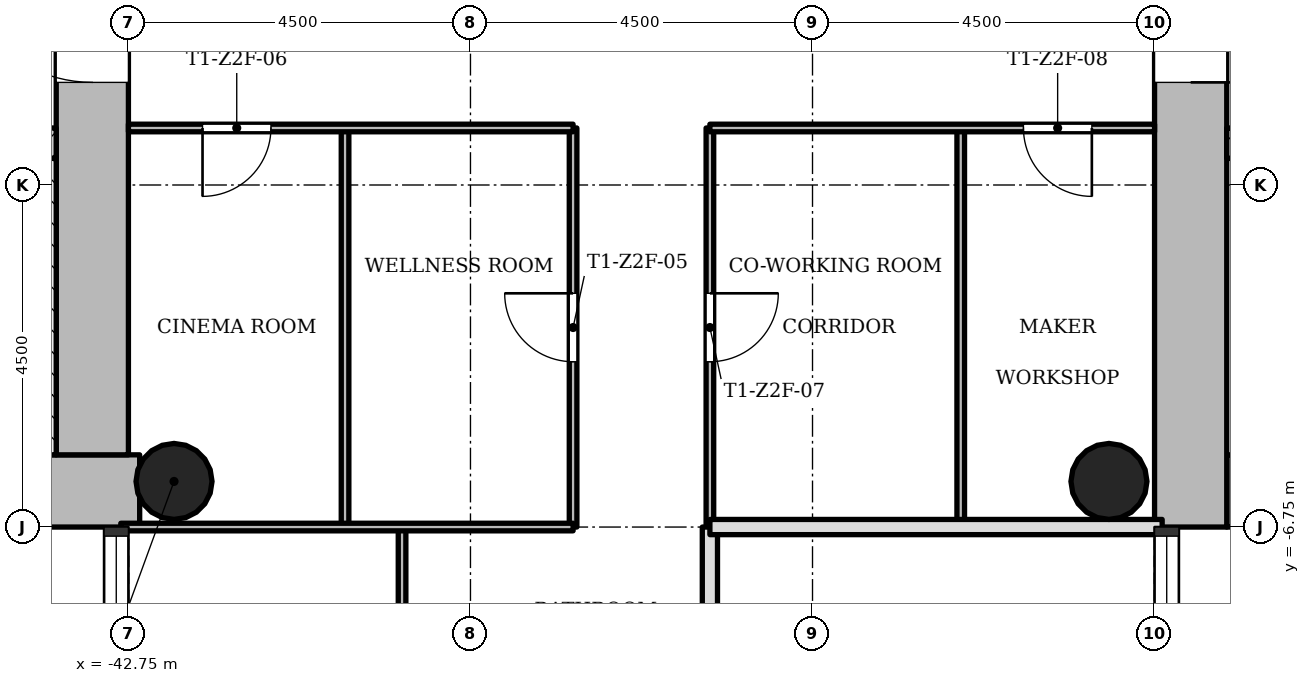
"""IFC4 building model, lengths in metres.
Left out: names, types, materials, properties, quantities, classifications, styles, units other than length and angle.
Written with IfcOpenShell. Run it as: python <this file> out.ifc"""

import sys

from ifc_helpers import new_model, si_unit, direction, frame, frame_2d, origin, origin_2d, place, context, subcontext, project, spatial, rectangle, hollow_circle, extrude, element, fill, save


model = new_model("IFC4")
c1 = context("Model", 3, precision=1e-05, world=origin(), true_north=direction((0.0, 1.0)))
c2 = subcontext(c1, "Body", "Model", "MODEL_VIEW")
j1 = project(units=[si_unit("LENGTHUNIT", "METRE"), si_unit("PLANEANGLEUNIT", "RADIAN")], contexts=[c1])
p1 = place(None, origin())
s1 = spatial("IfcSite", under=j1, at=p1, CompositionType="ELEMENT")
p2 = place(p1, origin())
s2 = spatial("IfcBuilding", under=s1, at=p2, CompositionType="ELEMENT")
p3 = place(p2, frame((0.0, 0.0, 107.2)))
s3 = spatial("IfcBuildingStorey", under=s2, at=p3, CompositionType="ELEMENT", Elevation=107.2)
p4 = place(p3, frame((-28.3, -6.275, 0.0), z_axis=(0.0, 0.0, 1.0), x_axis=(1.0, 0.0, 0.0)))
e1 = element("IfcWall", 1, at=p4, inside=s3, PredefinedType="SHEAR", context=c2, shape_type="SweptSolid", body=[
    extrude(rectangle(XDim=8.05, YDim=0.95, at=frame_2d((4.025, 0.0))), origin(), (0.0, 0.0, 1.0), 3.4),
])
p5 = place(p3, frame((-28.775, 5.8, 0.0), z_axis=(0.0, 0.0, 1.0), x_axis=(0.0, -1.0, 0.0)))
e2 = element("IfcWall", 2, at=p5, inside=s3, PredefinedType="SHEAR", context=c2, shape_type="SweptSolid", body=[
    extrude(rectangle(XDim=12.55, YDim=0.95, at=frame_2d((6.275, 0.0))), origin(), (0.0, 0.0, 1.0), 3.4),
])
p6 = place(p5, frame((4.9, 0.0, 0.0)))
e3 = element("IfcOpeningElement", 3, at=p6, cuts=e2, PredefinedType="OPENING", context=c2, shape_type="SweptSolid", body=[
    extrude(rectangle(XDim=1.8, YDim=2.1, at=frame_2d((0.9, 1.05))), frame((0.0, 0.485, 0.0), z_axis=(0.0, -1.0, 0.0), x_axis=(1.0, 0.0, 0.0)), (0.0, 0.0, 1.0), 0.97),
])
p7 = place(p3, frame((-28.3, -1.7, 0.0), z_axis=(0.0, 0.0, 1.0), x_axis=(1.0, 0.0, 0.0)))
e4 = element("IfcWall", 4, at=p7, inside=s3, PredefinedType="SHEAR", context=c2, shape_type="SweptSolid", body=[
    extrude(rectangle(XDim=7.1, YDim=0.4, at=frame_2d((3.55, 0.0))), origin(), (0.0, 0.0, 1.0), 3.4),
])
p8 = place(p7, frame((0.8, 0.0, 0.0)))
e5 = element("IfcOpeningElement", 5, at=p8, cuts=e4, PredefinedType="OPENING", context=c2, shape_type="SweptSolid", body=[
    extrude(rectangle(XDim=1.1, YDim=2.1, at=frame_2d((0.55, 1.05))), frame((0.0, 0.21, 0.0), z_axis=(0.0, -1.0, 0.0), x_axis=(1.0, 0.0, 0.0)), (0.0, 0.0, 1.0), 0.42),
])
p9 = place(p7, frame((3.0, 0.0, 0.0)))
e6 = element("IfcOpeningElement", 6, at=p9, cuts=e4, PredefinedType="OPENING", context=c2, shape_type="SweptSolid", body=[
    extrude(rectangle(XDim=1.1, YDim=2.1, at=frame_2d((0.55, 1.05))), frame((0.0, 0.21, 0.0), z_axis=(0.0, -1.0, 0.0), x_axis=(1.0, 0.0, 0.0)), (0.0, 0.0, 1.0), 0.42),
])
p10 = place(p7, frame((5.2, 0.0, 0.0)))
e7 = element("IfcOpeningElement", 7, at=p10, cuts=e4, PredefinedType="OPENING", context=c2, shape_type="SweptSolid", body=[
    extrude(rectangle(XDim=1.1, YDim=2.1, at=frame_2d((0.55, 1.05))), frame((0.0, 0.21, 0.0), z_axis=(0.0, -1.0, 0.0), x_axis=(1.0, 0.0, 0.0)), (0.0, 0.0, 1.0), 0.42),
])
p11 = place(p3, frame((-51.298, -6.275, 0.0), z_axis=(0.0, 0.0, 1.0), x_axis=(1.0, 0.0, 0.0)))
e8 = element("IfcWall", 8, at=p11, inside=s3, PredefinedType="SHEAR", context=c2, shape_type="SweptSolid", body=[
    extrude(rectangle(XDim=8.696, YDim=0.95, at=frame_2d((4.348, 0.0))), origin(), (0.0, 0.0, 1.0), 3.4),
])
p12 = place(p3, frame((-43.225, -5.8, 0.0), z_axis=(0.0, 0.0, 1.0), x_axis=(0.0, 1.0, 0.0)))
e9 = element("IfcWall", 9, at=p12, inside=s3, PredefinedType="SHEAR", context=c2, shape_type="SweptSolid", body=[
    extrude(rectangle(XDim=12.55, YDim=0.95, at=frame_2d((6.275, 0.0))), origin(), (0.0, 0.0, 1.0), 3.4),
])
p13 = place(p12, frame((4.9, 0.0, 0.0)))
e10 = element("IfcOpeningElement", 10, at=p13, cuts=e9, PredefinedType="OPENING", context=c2, shape_type="SweptSolid", body=[
    extrude(rectangle(XDim=1.8, YDim=2.1, at=frame_2d((0.9, 1.05))), frame((0.0, 0.485, 0.0), z_axis=(0.0, -1.0, 0.0), x_axis=(1.0, 0.0, 0.0)), (0.0, 0.0, 1.0), 0.97),
])
p14 = place(p3, frame((-50.8, -1.7, 0.0), z_axis=(0.0, 0.0, 1.0), x_axis=(1.0, 0.0, 0.0)))
e11 = element("IfcWall", 11, at=p14, inside=s3, PredefinedType="SHEAR", context=c2, shape_type="SweptSolid", body=[
    extrude(rectangle(XDim=7.1, YDim=0.4, at=frame_2d((3.55, 0.0))), origin(), (0.0, 0.0, 1.0), 3.4),
])
p15 = place(p14, frame((5.5, 0.0, 0.0)))
e12 = element("IfcOpeningElement", 12, at=p15, cuts=e11, PredefinedType="OPENING", context=c2, shape_type="SweptSolid", body=[
    extrude(rectangle(XDim=0.9, YDim=2.1, at=frame_2d((0.45, 1.05))), frame((0.0, 0.21, 0.0), z_axis=(0.0, -1.0, 0.0), x_axis=(1.0, 0.0, 0.0)), (0.0, 0.0, 1.0), 0.42),
])
for number, where, z_axis, x_axis in (
    (13, (-42.15, -6.15, 0.0), (0.0, 0.0, 1.0), (1.0, 0.0, 0.0)),
    (14, (-29.85, -6.15, 0.0), (0.0, 0.0, 1.0), (1.0, 0.0, 0.0)),
):
    element("IfcColumn", number, at=place(p3, frame(where, z_axis=z_axis, x_axis=x_axis)), inside=s3, PredefinedType="COLUMN", context=c2, shape_type="SweptSolid", body=[
        extrude(hollow_circle(Radius=0.5, WallThickness=0.036, at=origin_2d()), origin(), (0.0, 0.0, 1.0), 3.4),
    ])
p16 = place(p3, frame((-39.9, -6.75, 0.0), z_axis=(0.0, 0.0, 1.0), x_axis=(0.0, 1.0, 0.0)))
e15 = element("IfcWall", 15, at=p16, inside=s3, PredefinedType="PARTITIONING", context=c2, shape_type="SweptSolid", body=[
    extrude(rectangle(XDim=5.25, YDim=0.1, at=frame_2d((2.625, 0.0))), origin(), (0.0, 0.0, 1.0), 3.0),
])
p17 = place(p3, frame((-39.15, -15.75, 0.0), z_axis=(0.0, 0.0, 1.0), x_axis=(0.0, 1.0, 0.0)))
e16 = element("IfcWall", 16, at=p17, inside=s3, PredefinedType="PARTITIONING", context=c2, shape_type="SweptSolid", body=[
    extrude(rectangle(XDim=9.0, YDim=0.1, at=frame_2d((4.5, 0.0))), origin(), (0.0, 0.0, 1.0), 3.0),
])
p18 = place(p17, frame((5.55, 0.0, 0.0)))
e17 = element("IfcOpeningElement", 17, at=p18, cuts=e16, PredefinedType="OPENING", context=c2, shape_type="SweptSolid", body=[
    extrude(rectangle(XDim=0.9, YDim=2.1, at=frame_2d((0.45, 1.05))), frame((0.0, 0.06, 0.0), z_axis=(0.0, -1.0, 0.0), x_axis=(1.0, 0.0, 0.0)), (0.0, 0.0, 1.0), 0.12),
])
p19 = place(p3, frame((-36.9, -6.75, 0.0), z_axis=(0.0, 0.0, 1.0), x_axis=(0.0, 1.0, 0.0)))
e18 = element("IfcWall", 18, at=p19, inside=s3, PredefinedType="PARTITIONING", context=c2, shape_type="SweptSolid", body=[
    extrude(rectangle(XDim=5.25, YDim=0.1, at=frame_2d((2.625, 0.0))), origin(), (0.0, 0.0, 1.0), 3.0),
])
p20 = place(p19, frame((2.175, 0.0, 0.0)))
e19 = element("IfcOpeningElement", 19, at=p20, cuts=e18, PredefinedType="OPENING", context=c2, shape_type="SweptSolid", body=[
    extrude(rectangle(XDim=0.9, YDim=2.1, at=frame_2d((0.45, 1.05))), frame((0.0, 0.06, 0.0), z_axis=(0.0, -1.0, 0.0), x_axis=(1.0, 0.0, 0.0)), (0.0, 0.0, 1.0), 0.12),
])
p21 = place(p3, frame((-35.1, -6.75, 0.0), z_axis=(0.0, 0.0, 1.0), x_axis=(0.0, 1.0, 0.0)))
e20 = element("IfcWall", 20, at=p21, inside=s3, PredefinedType="PARTITIONING", context=c2, shape_type="SweptSolid", body=[
    extrude(rectangle(XDim=5.25, YDim=0.1, at=frame_2d((2.625, 0.0))), origin(), (0.0, 0.0, 1.0), 3.0),
])
p22 = place(p21, frame((2.175, 0.0, 0.0)))
e21 = element("IfcOpeningElement", 21, at=p22, cuts=e20, PredefinedType="OPENING", context=c2, shape_type="SweptSolid", body=[
    extrude(rectangle(XDim=0.9, YDim=2.1, at=frame_2d((0.45, 1.05))), frame((0.0, 0.06, 0.0), z_axis=(0.0, -1.0, 0.0), x_axis=(1.0, 0.0, 0.0)), (0.0, 0.0, 1.0), 0.12),
])
p23 = place(p3, frame((-35.1, -8.55, 0.0), z_axis=(0.0, 0.0, 1.0), x_axis=(0.0, 1.0, 0.0)))
e22 = element("IfcWall", 22, at=p23, inside=s3, PredefinedType="SOLIDWALL", context=c2, shape_type="SweptSolid", body=[
    extrude(rectangle(XDim=1.8, YDim=0.2, at=frame_2d((0.9, 0.0))), origin(), (0.0, 0.0, 1.0), 3.0),
])
p24 = place(p3, frame((-31.8, -6.75, 0.0), z_axis=(0.0, 0.0, 1.0), x_axis=(0.0, 1.0, 0.0)))
e23 = element("IfcWall", 23, at=p24, inside=s3, PredefinedType="PARTITIONING", context=c2, shape_type="SweptSolid", body=[
    extrude(rectangle(XDim=5.25, YDim=0.1, at=frame_2d((2.625, 0.0))), origin(), (0.0, 0.0, 1.0), 3.0),
])
p25 = place(p3, frame((-42.85, -6.75, 0.0), z_axis=(0.0, 0.0, 1.0), x_axis=(1.0, 0.0, 0.0)))
e24 = element("IfcWall", 24, at=p25, inside=s3, PredefinedType="PARTITIONING", context=c2, shape_type="SweptSolid", body=[
    extrude(rectangle(XDim=5.95, YDim=0.1, at=frame_2d((2.975, 0.0))), origin(), (0.0, 0.0, 1.0), 3.0),
])
p26 = place(p3, frame((-35.1, -6.75, 0.0), z_axis=(0.0, 0.0, 1.0), x_axis=(1.0, 0.0, 0.0)))
e25 = element("IfcWall", 25, at=p26, inside=s3, PredefinedType="SOLIDWALL", context=c2, shape_type="SweptSolid", body=[
    extrude(rectangle(XDim=5.95, YDim=0.2, at=frame_2d((2.975, 0.0))), origin(), (0.0, 0.0, 1.0), 3.0),
])
p27 = place(p3, frame((-42.75, -1.5, 0.0), z_axis=(0.0, 0.0, 1.0), x_axis=(1.0, 0.0, 0.0)))
e26 = element("IfcWall", 26, at=p27, inside=s3, PredefinedType="PARTITIONING", context=c2, shape_type="SweptSolid", body=[
    extrude(rectangle(XDim=5.85, YDim=0.1, at=frame_2d((2.925, 0.0))), origin(), (0.0, 0.0, 1.0), 3.0),
])
p28 = place(p27, frame((0.975, 0.0, 0.0)))
e27 = element("IfcOpeningElement", 27, at=p28, cuts=e26, PredefinedType="OPENING", context=c2, shape_type="SweptSolid", body=[
    extrude(rectangle(XDim=0.9, YDim=2.1, at=frame_2d((0.45, 1.05))), frame((0.0, 0.06, 0.0), z_axis=(0.0, -1.0, 0.0), x_axis=(1.0, 0.0, 0.0)), (0.0, 0.0, 1.0), 0.12),
])
p29 = place(p3, frame((-35.1, -1.5, 0.0), z_axis=(0.0, 0.0, 1.0), x_axis=(1.0, 0.0, 0.0)))
e28 = element("IfcWall", 28, at=p29, inside=s3, PredefinedType="PARTITIONING", context=c2, shape_type="SweptSolid", body=[
    extrude(rectangle(XDim=5.85, YDim=0.1, at=frame_2d((2.925, 0.0))), origin(), (0.0, 0.0, 1.0), 3.0),
])
p30 = place(p29, frame((4.125, 0.0, 0.0)))
e29 = element("IfcOpeningElement", 29, at=p30, cuts=e28, PredefinedType="OPENING", context=c2, shape_type="SweptSolid", body=[
    extrude(rectangle(XDim=0.9, YDim=2.1, at=frame_2d((0.45, 1.05))), frame((0.0, 0.06, 0.0), z_axis=(0.0, -1.0, 0.0), x_axis=(1.0, 0.0, 0.0)), (0.0, 0.0, 1.0), 0.12),
])
p31 = place(p3, frame((-43.825, -1.9, 0.0), z_axis=(0.0, 0.0, 1.0), x_axis=(0.0, -1.0, 0.0)))
e30 = element("IfcWall", 30, at=p31, inside=s3, PredefinedType="SHEAR", context=c2, shape_type="SweptSolid", body=[
    extrude(rectangle(XDim=3.9, YDim=0.25, at=frame_2d((1.95, 0.0))), origin(), (0.0, 0.0, 1.0), 3.4),
])
p32 = place(p20, origin())
e31 = element("IfcDoor", 31, at=p32, inside=s3, OperationType="SINGLE_SWING_LEFT", PredefinedType="DOOR", context=c2, shape_type="SweptSolid", body=[
    extrude(rectangle(XDim=0.9, YDim=2.1, at=frame_2d((0.45, 1.05))), frame((0.0, 0.025, 0.0), z_axis=(0.0, -1.0, 0.0), x_axis=(1.0, 0.0, 0.0)), (0.0, 0.0, 1.0), 0.05),
])
fill(e19, e31)
p33 = place(p28, origin())
e32 = element("IfcDoor", 32, at=p33, inside=s3, OperationType="SINGLE_SWING_LEFT", PredefinedType="DOOR", context=c2, shape_type="SweptSolid", body=[
    extrude(rectangle(XDim=0.9, YDim=2.1, at=frame_2d((0.45, 1.05))), frame((0.0, 0.025, 0.0), z_axis=(0.0, -1.0, 0.0), x_axis=(1.0, 0.0, 0.0)), (0.0, 0.0, 1.0), 0.05),
])
fill(e27, e32)
p34 = place(p22, origin())
e33 = element("IfcDoor", 33, at=p34, inside=s3, OperationType="SINGLE_SWING_RIGHT", PredefinedType="DOOR", context=c2, shape_type="SweptSolid", body=[
    extrude(rectangle(XDim=0.9, YDim=2.1, at=frame_2d((0.45, 1.05))), frame((0.0, 0.025, 0.0), z_axis=(0.0, -1.0, 0.0), x_axis=(1.0, 0.0, 0.0)), (0.0, 0.0, 1.0), 0.05),
])
fill(e21, e33)
p35 = place(p30, origin())
e34 = element("IfcDoor", 34, at=p35, inside=s3, OperationType="SINGLE_SWING_RIGHT", PredefinedType="DOOR", context=c2, shape_type="SweptSolid", body=[
    extrude(rectangle(XDim=0.9, YDim=2.1, at=frame_2d((0.45, 1.05))), frame((0.0, 0.025, 0.0), z_axis=(0.0, -1.0, 0.0), x_axis=(1.0, 0.0, 0.0)), (0.0, 0.0, 1.0), 0.05),
])
fill(e29, e34)
p36 = place(p6, origin())
e35 = element("IfcDoor", 35, at=p36, inside=s3, OperationType="SINGLE_SWING_LEFT", PredefinedType="DOOR", context=c2, shape_type="SweptSolid", body=[
    extrude(rectangle(XDim=1.8, YDim=2.1, at=frame_2d((0.9, 1.05))), frame((0.0, 0.025, 0.0), z_axis=(0.0, -1.0, 0.0), x_axis=(1.0, 0.0, 0.0)), (0.0, 0.0, 1.0), 0.05),
])
fill(e3, e35)
p37 = place(p13, origin())
e36 = element("IfcDoor", 36, at=p37, inside=s3, OperationType="SINGLE_SWING_LEFT", PredefinedType="DOOR", context=c2, shape_type="SweptSolid", body=[
    extrude(rectangle(XDim=1.8, YDim=2.1, at=frame_2d((0.9, 1.05))), frame((0.0, 0.025, 0.0), z_axis=(0.0, -1.0, 0.0), x_axis=(1.0, 0.0, 0.0)), (0.0, 0.0, 1.0), 0.05),
])
fill(e10, e36)
save(model, sys.argv[1])
